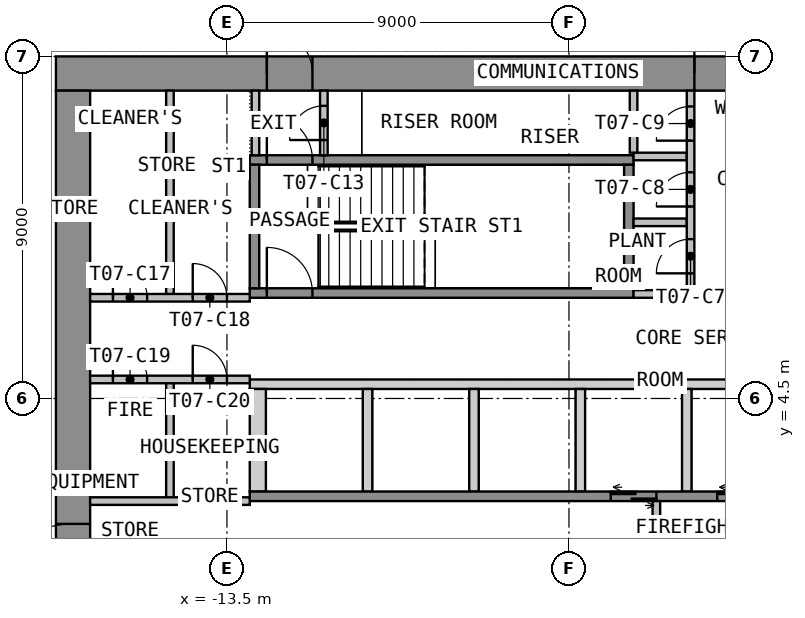
"""IFC4 building model, lengths in metres.
Left out: names, types, materials, properties, quantities, classifications, styles, units other than length and angle.
Written with IfcOpenShell. Run it as: python <this file> out.ifc"""

import sys

from ifc_helpers import new_model, si_unit, direction, frame, frame_2d, origin, place, context, subcontext, project, spatial, polyline, rectangle, outline, extrude, element, fill, save


model = new_model("IFC4")
c1 = context("Model", 3, precision=1e-05, world=origin(), true_north=direction((0.0, 1.0)))
c2 = subcontext(c1, "Body", "Model", "MODEL_VIEW")
j1 = project(units=[si_unit("LENGTHUNIT", "METRE"), si_unit("PLANEANGLEUNIT", "RADIAN")], contexts=[c1])
p1 = place(None, origin())
s1 = spatial("IfcSite", under=j1, at=p1, CompositionType="ELEMENT")
p2 = place(p1, origin())
s2 = spatial("IfcBuilding", under=s1, at=p2, CompositionType="ELEMENT")
p3 = place(p2, frame((0.0, 0.0, 104.7)))
s3 = spatial("IfcBuildingStorey", under=s2, at=p3, CompositionType="ELEMENT", Elevation=104.7)
p4 = place(p3, frame((-18.0, 13.05, 0.0), z_axis=(0.0, 0.0, 1.0), x_axis=(1.0, 0.0, 0.0)))
e1 = element("IfcWall", 1, at=p4, inside=s3, PredefinedType="SHEAR", context=c2, shape_type="SweptSolid", body=[
    extrude(rectangle(XDim=36.0, YDim=0.9, at=frame_2d((18.0, 0.0))), origin(), (0.0, 0.0, 1.0), 3.525),
])
p5 = place(p4, frame((16.8, 0.0, 0.0)))
e2 = element("IfcOpeningElement", 2, at=p5, cuts=e1, PredefinedType="OPENING", context=c2, shape_type="SweptSolid", body=[
    extrude(rectangle(XDim=2.4, YDim=2.1, at=frame_2d((1.2, 1.05))), frame((0.0, 0.46, 0.0), z_axis=(0.0, -1.0, 0.0), x_axis=(1.0, 0.0, 0.0)), (0.0, 0.0, 1.0), 0.92),
])
p6 = place(p4, frame((5.55, 0.0, 0.0)))
e3 = element("IfcOpeningElement", 3, at=p6, cuts=e1, PredefinedType="OPENING", context=c2, shape_type="SweptSolid", body=[
    extrude(rectangle(XDim=1.2, YDim=2.1, at=frame_2d((0.6, 1.05))), frame((0.0, 0.46, 0.0), z_axis=(0.0, -1.0, 0.0), x_axis=(1.0, 0.0, 0.0)), (0.0, 0.0, 1.0), 0.92),
])
p7 = place(p4, frame((29.25, 0.0, 0.0)))
e4 = element("IfcOpeningElement", 4, at=p7, cuts=e1, PredefinedType="OPENING", context=c2, shape_type="SweptSolid", body=[
    extrude(rectangle(XDim=1.2, YDim=2.1, at=frame_2d((0.6, 1.05))), frame((0.0, 0.46, 0.0), z_axis=(0.0, -1.0, 0.0), x_axis=(1.0, 0.0, 0.0)), (0.0, 0.0, 1.0), 0.92),
])
p8 = place(p3, frame((-17.55, -12.6, 0.0), z_axis=(0.0, 0.0, 1.0), x_axis=(0.0, 1.0, 0.0)))
e5 = element("IfcWall", 5, at=p8, inside=s3, PredefinedType="SHEAR", context=c2, shape_type="SweptSolid", body=[
    extrude(rectangle(XDim=25.2, YDim=0.9, at=frame_2d((12.6, 0.0))), origin(), (0.0, 0.0, 1.0), 3.525),
])
p9 = place(p8, frame((11.4, 0.0, 0.0)))
e6 = element("IfcOpeningElement", 6, at=p9, cuts=e5, PredefinedType="OPENING", context=c2, shape_type="SweptSolid", body=[
    extrude(rectangle(XDim=2.4, YDim=2.1, at=frame_2d((1.2, 1.05))), frame((0.0, 0.46, 0.0), z_axis=(0.0, -1.0, 0.0), x_axis=(1.0, 0.0, 0.0)), (0.0, 0.0, 1.0), 0.92),
])
p10 = place(p3, origin())
e7 = element("IfcWall", 7, at=p10, inside=s3, PredefinedType="SHEAR", context=c2, shape_type="SweptSolid", body=[
    extrude(outline(polyline([(-12.9, 4.75), (12.9, 4.75), (12.9, 5.0), (-12.9, 5.0), (-12.9, 4.75)])), origin(), (0.0, 0.0, 1.0), 3.525),
])
p11 = place(p3, origin())
e8 = element("IfcWall", 8, at=p11, inside=s3, PredefinedType="SHEAR", context=c2, shape_type="SweptSolid", body=[
    extrude(outline(polyline([(-12.9, 2.05), (-12.475, 2.05), (-12.475, 4.75), (-12.9, 4.75), (-12.9, 2.05)])), origin(), (0.0, 0.0, 1.0), 3.525),
])
p12 = place(p3, origin())
e9 = element("IfcWall", 9, at=p12, inside=s3, PredefinedType="SHEAR", context=c2, shape_type="SweptSolid", body=[
    extrude(outline(polyline([(-9.925, 2.05), (-9.675, 2.05), (-9.675, 4.75), (-9.925, 4.75), (-9.925, 2.05)])), origin(), (0.0, 0.0, 1.0), 3.525),
])
p13 = place(p3, origin())
e10 = element("IfcWall", 10, at=p13, inside=s3, PredefinedType="SHEAR", context=c2, shape_type="SweptSolid", body=[
    extrude(outline(polyline([(-7.125, 2.05), (-6.875, 2.05), (-6.875, 4.75), (-7.125, 4.75), (-7.125, 2.05)])), origin(), (0.0, 0.0, 1.0), 3.525),
])
p14 = place(p3, origin())
e11 = element("IfcWall", 11, at=p14, inside=s3, PredefinedType="SHEAR", context=c2, shape_type="SweptSolid", body=[
    extrude(outline(polyline([(-4.325, 2.05), (-4.075, 2.05), (-4.075, 4.75), (-4.325, 4.75), (-4.325, 2.05)])), origin(), (0.0, 0.0, 1.0), 3.525),
])
p15 = place(p3, origin())
e12 = element("IfcWall", 12, at=p15, inside=s3, PredefinedType="SHEAR", context=c2, shape_type="SweptSolid", body=[
    extrude(outline(polyline([(-1.525, 2.05), (-1.275, 2.05), (-1.275, 4.75), (-1.525, 4.75), (-1.525, 2.05)])), origin(), (0.0, 0.0, 1.0), 3.525),
])
p16 = place(p3, frame((-12.9, 1.925, 0.0), z_axis=(0.0, 0.0, 1.0), x_axis=(1.0, 0.0, 0.0)))
e13 = element("IfcWall", 13, at=p16, inside=s3, PredefinedType="SHEAR", context=c2, shape_type="SweptSolid", body=[
    extrude(rectangle(XDim=25.8, YDim=0.25, at=frame_2d((12.9, 0.0))), origin(), (0.0, 0.0, 1.0), 3.525),
])
p17 = place(p16, frame((9.5, 0.0, 0.0)))
e14 = element("IfcOpeningElement", 14, at=p17, cuts=e13, PredefinedType="OPENING", context=c2, shape_type="SweptSolid", body=[
    extrude(rectangle(XDim=1.2, YDim=2.1, at=frame_2d((0.6, 1.05))), frame((0.0, 0.135, 0.0), z_axis=(0.0, -1.0, 0.0), x_axis=(1.0, 0.0, 0.0)), (0.0, 0.0, 1.0), 0.27),
])
p18 = place(p16, frame((12.3, 0.0, 0.0)))
e15 = element("IfcOpeningElement", 15, at=p18, cuts=e13, PredefinedType="OPENING", context=c2, shape_type="SweptSolid", body=[
    extrude(rectangle(XDim=1.2, YDim=2.1, at=frame_2d((0.6, 1.05))), frame((0.0, 0.135, 0.0), z_axis=(0.0, -1.0, 0.0), x_axis=(1.0, 0.0, 0.0)), (0.0, 0.0, 1.0), 0.27),
])
p19 = place(p16, frame((15.1, 0.0, 0.0)))
e16 = element("IfcOpeningElement", 16, at=p19, cuts=e13, PredefinedType="OPENING", context=c2, shape_type="SweptSolid", body=[
    extrude(rectangle(XDim=1.2, YDim=2.1, at=frame_2d((0.6, 1.05))), frame((0.0, 0.135, 0.0), z_axis=(0.0, -1.0, 0.0), x_axis=(1.0, 0.0, 0.0)), (0.0, 0.0, 1.0), 0.27),
])
p20 = place(p16, frame((17.9, 0.0, 0.0)))
e17 = element("IfcOpeningElement", 17, at=p20, cuts=e13, PredefinedType="OPENING", context=c2, shape_type="SweptSolid", body=[
    extrude(rectangle(XDim=1.2, YDim=2.1, at=frame_2d((0.6, 1.05))), frame((0.0, 0.135, 0.0), z_axis=(0.0, -1.0, 0.0), x_axis=(1.0, 0.0, 0.0)), (0.0, 0.0, 1.0), 0.27),
])
p21 = place(p16, frame((20.7, 0.0, 0.0)))
e18 = element("IfcOpeningElement", 18, at=p21, cuts=e13, PredefinedType="OPENING", context=c2, shape_type="SweptSolid", body=[
    extrude(rectangle(XDim=1.2, YDim=2.1, at=frame_2d((0.6, 1.05))), frame((0.0, 0.135, 0.0), z_axis=(0.0, -1.0, 0.0), x_axis=(1.0, 0.0, 0.0)), (0.0, 0.0, 1.0), 0.27),
])
p22 = place(p16, frame((23.5, 0.0, 0.0)))
e19 = element("IfcOpeningElement", 19, at=p22, cuts=e13, PredefinedType="OPENING", context=c2, shape_type="SweptSolid", body=[
    extrude(rectangle(XDim=1.2, YDim=2.1, at=frame_2d((0.6, 1.05))), frame((0.0, 0.135, 0.0), z_axis=(0.0, -1.0, 0.0), x_axis=(1.0, 0.0, 0.0)), (0.0, 0.0, 1.0), 0.27),
])
p23 = place(p3, frame((-2.2, -1.8, 0.0), z_axis=(0.0, 0.0, 1.0), x_axis=(0.0, 1.0, 0.0)))
e20 = element("IfcWall", 20, at=p23, inside=s3, PredefinedType="PARTITIONING", context=c2, shape_type="SweptSolid", body=[
    extrude(rectangle(XDim=3.6, YDim=0.2, at=frame_2d((1.8, 0.0))), origin(), (0.0, 0.0, 1.0), 3.525),
])
p24 = place(p23, frame((1.2, 0.0, 0.0)))
e21 = element("IfcOpeningElement", 21, at=p24, cuts=e20, PredefinedType="OPENING", context=c2, shape_type="SweptSolid", body=[
    extrude(rectangle(XDim=1.2, YDim=2.1, at=frame_2d((0.6, 1.05))), frame((0.0, 0.11, 0.0), z_axis=(0.0, -1.0, 0.0), x_axis=(1.0, 0.0, 0.0)), (0.0, 0.0, 1.0), 0.22),
])
p25 = place(p3, frame((-12.9, 7.275, 0.0), z_axis=(0.0, 0.0, 1.0), x_axis=(1.0, 0.0, 0.0)))
e22 = element("IfcWall", 22, at=p25, inside=s3, PredefinedType="SHEAR", context=c2, shape_type="SweptSolid", body=[
    extrude(rectangle(XDim=10.1, YDim=0.25, at=frame_2d((5.05, 0.0))), origin(), (0.0, 0.0, 1.0), 3.525),
])
p26 = place(p25, frame((0.45, 0.0, 0.0)))
e23 = element("IfcOpeningElement", 23, at=p26, cuts=e22, PredefinedType="OPENING", context=c2, shape_type="SweptSolid", body=[
    extrude(rectangle(XDim=1.2, YDim=2.1, at=frame_2d((0.6, 1.05))), frame((0.0, 0.135, 0.0), z_axis=(0.0, -1.0, 0.0), x_axis=(1.0, 0.0, 0.0)), (0.0, 0.0, 1.0), 0.27),
])
p27 = place(p3, frame((-12.9, 10.775, 0.0), z_axis=(0.0, 0.0, 1.0), x_axis=(1.0, 0.0, 0.0)))
e24 = element("IfcWall", 24, at=p27, inside=s3, PredefinedType="SHEAR", context=c2, shape_type="SweptSolid", body=[
    extrude(rectangle(XDim=10.1, YDim=0.25, at=frame_2d((5.05, 0.0))), origin(), (0.0, 0.0, 1.0), 3.525),
])
p28 = place(p27, frame((0.45, 0.0, 0.0)))
e25 = element("IfcOpeningElement", 25, at=p28, cuts=e24, PredefinedType="OPENING", context=c2, shape_type="SweptSolid", body=[
    extrude(rectangle(XDim=1.2, YDim=2.1, at=frame_2d((0.6, 1.05))), frame((0.0, 0.135, 0.0), z_axis=(0.0, -1.0, 0.0), x_axis=(1.0, 0.0, 0.0)), (0.0, 0.0, 1.0), 0.27),
])
for number, where, z_axis, x_axis in (
    (26, (-12.775, 7.4, 0.0), (0.0, 0.0, 1.0), (0.0, 1.0, 0.0)),
    (27, (-2.925, 7.4, 0.0), (0.0, 0.0, 1.0), (0.0, 1.0, 0.0)),
):
    element("IfcWall", number, at=place(p3, frame(where, z_axis=z_axis, x_axis=x_axis)), inside=s3, PredefinedType="SHEAR", context=c2, shape_type="SweptSolid", body=[
        extrude(rectangle(XDim=3.25, YDim=0.25, at=frame_2d((1.625, 0.0))), origin(), (0.0, 0.0, 1.0), 3.525),
    ])
for number, where, z_axis, x_axis in (
    (28, (-2.8, 7.25, 0.0), (0.0, 0.0, 1.0), (1.0, 0.0, 0.0)),
    (29, (-2.8, 9.135, 0.0), (0.0, 0.0, 1.0), (1.0, 0.0, 0.0)),
    (30, (-2.8, 10.867, 0.0), (0.0, 0.0, 1.0), (1.0, 0.0, 0.0)),
):
    element("IfcWall", number, at=place(p3, frame(where, z_axis=z_axis, x_axis=x_axis)), inside=s3, PredefinedType="PARTITIONING", context=c2, shape_type="SweptSolid", body=[
        extrude(rectangle(XDim=1.4, YDim=0.2, at=frame_2d((0.7, 0.0))), origin(), (0.0, 0.0, 1.0), 3.525),
    ])
p29 = place(p3, frame((-1.3, 7.15, 0.0), z_axis=(0.0, 0.0, 1.0), x_axis=(0.0, 1.0, 0.0)))
e31 = element("IfcWall", 31, at=p29, inside=s3, PredefinedType="PARTITIONING", context=c2, shape_type="SweptSolid", body=[
    extrude(rectangle(XDim=5.45, YDim=0.2, at=frame_2d((2.725, 0.0))), origin(), (0.0, 0.0, 1.0), 3.525),
])
p30 = place(p29, frame((0.643, 0.0, 0.0)))
e32 = element("IfcOpeningElement", 32, at=p30, cuts=e31, PredefinedType="OPENING", context=c2, shape_type="SweptSolid", body=[
    extrude(rectangle(XDim=0.9, YDim=2.1, at=frame_2d((0.45, 1.05))), frame((0.0, 0.11, 0.0), z_axis=(0.0, -1.0, 0.0), x_axis=(1.0, 0.0, 0.0)), (0.0, 0.0, 1.0), 0.22),
])
p31 = place(p29, frame((2.401, 0.0, 0.0)))
e33 = element("IfcOpeningElement", 33, at=p31, cuts=e31, PredefinedType="OPENING", context=c2, shape_type="SweptSolid", body=[
    extrude(rectangle(XDim=0.9, YDim=2.1, at=frame_2d((0.45, 1.05))), frame((0.0, 0.11, 0.0), z_axis=(0.0, -1.0, 0.0), x_axis=(1.0, 0.0, 0.0)), (0.0, 0.0, 1.0), 0.22),
])
p32 = place(p29, frame((4.134, 0.0, 0.0)))
e34 = element("IfcOpeningElement", 34, at=p32, cuts=e31, PredefinedType="OPENING", context=c2, shape_type="SweptSolid", body=[
    extrude(rectangle(XDim=0.9, YDim=2.1, at=frame_2d((0.45, 1.05))), frame((0.0, 0.11, 0.0), z_axis=(0.0, -1.0, 0.0), x_axis=(1.0, 0.0, 0.0)), (0.0, 0.0, 1.0), 0.22),
])
p33 = place(p3, frame((-12.75, 10.9, 0.0), z_axis=(0.0, 0.0, 1.0), x_axis=(0.0, 1.0, 0.0)))
e35 = element("IfcWall", 35, at=p33, inside=s3, PredefinedType="PARTITIONING", context=c2, shape_type="SweptSolid", body=[
    extrude(rectangle(XDim=1.7, YDim=0.2, at=frame_2d((0.85, 0.0))), origin(), (0.0, 0.0, 1.0), 3.525),
])
p34 = place(p3, frame((-10.95, 10.9, 0.0), z_axis=(0.0, 0.0, 1.0), x_axis=(0.0, 1.0, 0.0)))
e36 = element("IfcWall", 36, at=p34, inside=s3, PredefinedType="PARTITIONING", context=c2, shape_type="SweptSolid", body=[
    extrude(rectangle(XDim=1.7, YDim=0.2, at=frame_2d((0.85, 0.0))), origin(), (0.0, 0.0, 1.0), 3.525),
])
p35 = place(p34, frame((0.4, 0.0, 0.0)))
e37 = element("IfcOpeningElement", 37, at=p35, cuts=e36, PredefinedType="OPENING", context=c2, shape_type="SweptSolid", body=[
    extrude(rectangle(XDim=0.9, YDim=2.1, at=frame_2d((0.45, 1.05))), frame((0.0, 0.11, 0.0), z_axis=(0.0, -1.0, 0.0), x_axis=(1.0, 0.0, 0.0)), (0.0, 0.0, 1.0), 0.22),
])
p36 = place(p3, frame((-15.0, 7.15, 0.0), z_axis=(0.0, 0.0, 1.0), x_axis=(0.0, 1.0, 0.0)))
e38 = element("IfcWall", 38, at=p36, inside=s3, PredefinedType="PARTITIONING", context=c2, shape_type="SweptSolid", body=[
    extrude(rectangle(XDim=5.45, YDim=0.2, at=frame_2d((2.725, 0.0))), origin(), (0.0, 0.0, 1.0), 3.525),
])
p37 = place(p3, frame((-17.1, 7.15, 0.0), z_axis=(0.0, 0.0, 1.0), x_axis=(1.0, 0.0, 0.0)))
e39 = element("IfcWall", 39, at=p37, inside=s3, PredefinedType="PARTITIONING", context=c2, shape_type="SweptSolid", body=[
    extrude(rectangle(XDim=4.2, YDim=0.2, at=frame_2d((2.1, 0.0))), origin(), (0.0, 0.0, 1.0), 3.525),
])
p38 = place(p37, frame((0.6, 0.0, 0.0)))
e40 = element("IfcOpeningElement", 40, at=p38, cuts=e39, PredefinedType="OPENING", context=c2, shape_type="SweptSolid", body=[
    extrude(rectangle(XDim=0.9, YDim=2.1, at=frame_2d((0.45, 1.05))), frame((0.0, 0.11, 0.0), z_axis=(0.0, -1.0, 0.0), x_axis=(1.0, 0.0, 0.0)), (0.0, 0.0, 1.0), 0.22),
])
p39 = place(p37, frame((2.7, 0.0, 0.0)))
e41 = element("IfcOpeningElement", 41, at=p39, cuts=e39, PredefinedType="OPENING", context=c2, shape_type="SweptSolid", body=[
    extrude(rectangle(XDim=0.9, YDim=2.1, at=frame_2d((0.45, 1.05))), frame((0.0, 0.11, 0.0), z_axis=(0.0, -1.0, 0.0), x_axis=(1.0, 0.0, 0.0)), (0.0, 0.0, 1.0), 0.22),
])
p40 = place(p3, frame((-15.0, 1.8, 0.0), z_axis=(0.0, 0.0, 1.0), x_axis=(0.0, 1.0, 0.0)))
e42 = element("IfcWall", 42, at=p40, inside=s3, PredefinedType="PARTITIONING", context=c2, shape_type="SweptSolid", body=[
    extrude(rectangle(XDim=3.2, YDim=0.2, at=frame_2d((1.6, 0.0))), origin(), (0.0, 0.0, 1.0), 3.525),
])
p41 = place(p3, frame((-17.1, 5.0, 0.0), z_axis=(0.0, 0.0, 1.0), x_axis=(1.0, 0.0, 0.0)))
e43 = element("IfcWall", 43, at=p41, inside=s3, PredefinedType="PARTITIONING", context=c2, shape_type="SweptSolid", body=[
    extrude(rectangle(XDim=4.2, YDim=0.2, at=frame_2d((2.1, 0.0))), origin(), (0.0, 0.0, 1.0), 3.525),
])
p42 = place(p41, frame((0.6, 0.0, 0.0)))
e44 = element("IfcOpeningElement", 44, at=p42, cuts=e43, PredefinedType="OPENING", context=c2, shape_type="SweptSolid", body=[
    extrude(rectangle(XDim=0.9, YDim=2.1, at=frame_2d((0.45, 1.05))), frame((0.0, 0.11, 0.0), z_axis=(0.0, -1.0, 0.0), x_axis=(1.0, 0.0, 0.0)), (0.0, 0.0, 1.0), 0.22),
])
p43 = place(p41, frame((2.7, 0.0, 0.0)))
e45 = element("IfcOpeningElement", 45, at=p43, cuts=e43, PredefinedType="OPENING", context=c2, shape_type="SweptSolid", body=[
    extrude(rectangle(XDim=0.9, YDim=2.1, at=frame_2d((0.45, 1.05))), frame((0.0, 0.11, 0.0), z_axis=(0.0, -1.0, 0.0), x_axis=(1.0, 0.0, 0.0)), (0.0, 0.0, 1.0), 0.22),
])
p44 = place(p3, frame((-17.1, 1.8, 0.0), z_axis=(0.0, 0.0, 1.0), x_axis=(1.0, 0.0, 0.0)))
e46 = element("IfcWall", 46, at=p44, inside=s3, PredefinedType="PARTITIONING", context=c2, shape_type="SweptSolid", body=[
    extrude(rectangle(XDim=4.2, YDim=0.2, at=frame_2d((2.1, 0.0))), origin(), (0.0, 0.0, 1.0), 3.525),
])
p45 = place(p3, frame((-2.8, 10.969, 0.0), z_axis=(0.0, 0.0, 1.0), x_axis=(0.0, 1.0, 0.0)))
e47 = element("IfcWall", 47, at=p45, inside=s3, PredefinedType="PARTITIONING", context=c2, shape_type="SweptSolid", body=[
    extrude(rectangle(XDim=1.631, YDim=0.2, at=frame_2d((0.815, 0.0))), origin(), (0.0, 0.0, 1.0), 3.525),
])
p46 = place(p9, origin())
e48 = element("IfcDoor", 48, at=p46, inside=s3, OperationType="DOUBLE_DOOR_DOUBLE_SWING", PredefinedType="DOOR", context=c2, shape_type="SweptSolid", body=[
    extrude(rectangle(XDim=2.4, YDim=2.1, at=frame_2d((1.2, 1.05))), frame((0.0, 0.025, 0.0), z_axis=(0.0, -1.0, 0.0), x_axis=(1.0, 0.0, 0.0)), (0.0, 0.0, 1.0), 0.05),
])
fill(e6, e48)
p47 = place(p5, origin())
e49 = element("IfcDoor", 49, at=p47, inside=s3, OperationType="DOUBLE_DOOR_DOUBLE_SWING", PredefinedType="DOOR", context=c2, shape_type="SweptSolid", body=[
    extrude(rectangle(XDim=2.4, YDim=2.1, at=frame_2d((1.2, 1.05))), frame((0.0, 0.025, 0.0), z_axis=(0.0, -1.0, 0.0), x_axis=(1.0, 0.0, 0.0)), (0.0, 0.0, 1.0), 0.05),
])
fill(e2, e49)
p48 = place(p6, origin())
e50 = element("IfcDoor", 50, at=p48, inside=s3, OperationType="SINGLE_SWING_RIGHT", PredefinedType="DOOR", context=c2, shape_type="SweptSolid", body=[
    extrude(rectangle(XDim=1.2, YDim=2.1, at=frame_2d((0.6, 1.05))), frame((0.0, 0.025, 0.0), z_axis=(0.0, -1.0, 0.0), x_axis=(1.0, 0.0, 0.0)), (0.0, 0.0, 1.0), 0.05),
])
fill(e3, e50)
p49 = place(p17, origin())
e51 = element("IfcDoor", 51, at=p49, inside=s3, OperationType="DOUBLE_DOOR_SLIDING", PredefinedType="DOOR", context=c2, shape_type="SweptSolid", body=[
    extrude(rectangle(XDim=1.2, YDim=2.1, at=frame_2d((0.6, 1.05))), frame((0.0, 0.025, 0.0), z_axis=(0.0, -1.0, 0.0), x_axis=(1.0, 0.0, 0.0)), (0.0, 0.0, 1.0), 0.05),
])
fill(e14, e51)
p50 = place(p18, origin())
e52 = element("IfcDoor", 52, at=p50, inside=s3, OperationType="DOUBLE_DOOR_SLIDING", PredefinedType="DOOR", context=c2, shape_type="SweptSolid", body=[
    extrude(rectangle(XDim=1.2, YDim=2.1, at=frame_2d((0.6, 1.05))), frame((0.0, 0.025, 0.0), z_axis=(0.0, -1.0, 0.0), x_axis=(1.0, 0.0, 0.0)), (0.0, 0.0, 1.0), 0.05),
])
fill(e15, e52)
p51 = place(p26, origin())
e53 = element("IfcDoor", 53, at=p51, inside=s3, OperationType="SINGLE_SWING_LEFT", PredefinedType="DOOR", context=c2, shape_type="SweptSolid", body=[
    extrude(rectangle(XDim=1.2, YDim=2.1, at=frame_2d((0.6, 1.05))), frame((0.0, 0.025, 0.0), z_axis=(0.0, -1.0, 0.0), x_axis=(1.0, 0.0, 0.0)), (0.0, 0.0, 1.0), 0.05),
])
fill(e23, e53)
p52 = place(p30, origin())
e54 = element("IfcDoor", 54, at=p52, inside=s3, OperationType="SINGLE_SWING_LEFT", PredefinedType="DOOR", context=c2, shape_type="SweptSolid", body=[
    extrude(rectangle(XDim=0.9, YDim=2.1, at=frame_2d((0.45, 1.05))), frame((0.0, 0.025, 0.0), z_axis=(0.0, -1.0, 0.0), x_axis=(1.0, 0.0, 0.0)), (0.0, 0.0, 1.0), 0.05),
])
fill(e32, e54)
p53 = place(p31, origin())
e55 = element("IfcDoor", 55, at=p53, inside=s3, OperationType="SINGLE_SWING_LEFT", PredefinedType="DOOR", context=c2, shape_type="SweptSolid", body=[
    extrude(rectangle(XDim=0.9, YDim=2.1, at=frame_2d((0.45, 1.05))), frame((0.0, 0.025, 0.0), z_axis=(0.0, -1.0, 0.0), x_axis=(1.0, 0.0, 0.0)), (0.0, 0.0, 1.0), 0.05),
])
fill(e33, e55)
p54 = place(p32, origin())
e56 = element("IfcDoor", 56, at=p54, inside=s3, OperationType="SINGLE_SWING_LEFT", PredefinedType="DOOR", context=c2, shape_type="SweptSolid", body=[
    extrude(rectangle(XDim=0.9, YDim=2.1, at=frame_2d((0.45, 1.05))), frame((0.0, 0.025, 0.0), z_axis=(0.0, -1.0, 0.0), x_axis=(1.0, 0.0, 0.0)), (0.0, 0.0, 1.0), 0.05),
])
fill(e34, e56)
p55 = place(p28, origin())
e57 = element("IfcDoor", 57, at=p55, inside=s3, OperationType="SINGLE_SWING_RIGHT", PredefinedType="DOOR", context=c2, shape_type="SweptSolid", body=[
    extrude(rectangle(XDim=1.2, YDim=2.1, at=frame_2d((0.6, 1.05))), frame((0.0, 0.025, 0.0), z_axis=(0.0, -1.0, 0.0), x_axis=(1.0, 0.0, 0.0)), (0.0, 0.0, 1.0), 0.05),
])
fill(e25, e57)
p56 = place(p35, origin())
e58 = element("IfcDoor", 58, at=p56, inside=s3, OperationType="SINGLE_SWING_LEFT", PredefinedType="DOOR", context=c2, shape_type="SweptSolid", body=[
    extrude(rectangle(XDim=0.9, YDim=2.1, at=frame_2d((0.45, 1.05))), frame((0.0, 0.025, 0.0), z_axis=(0.0, -1.0, 0.0), x_axis=(1.0, 0.0, 0.0)), (0.0, 0.0, 1.0), 0.05),
])
fill(e37, e58)
p57 = place(p38, origin())
e59 = element("IfcDoor", 59, at=p57, inside=s3, OperationType="SINGLE_SWING_LEFT", PredefinedType="DOOR", context=c2, shape_type="SweptSolid", body=[
    extrude(rectangle(XDim=0.9, YDim=2.1, at=frame_2d((0.45, 1.05))), frame((0.0, 0.025, 0.0), z_axis=(0.0, -1.0, 0.0), x_axis=(1.0, 0.0, 0.0)), (0.0, 0.0, 1.0), 0.05),
])
fill(e40, e59)
p58 = place(p39, origin())
e60 = element("IfcDoor", 60, at=p58, inside=s3, OperationType="SINGLE_SWING_LEFT", PredefinedType="DOOR", context=c2, shape_type="SweptSolid", body=[
    extrude(rectangle(XDim=0.9, YDim=2.1, at=frame_2d((0.45, 1.05))), frame((0.0, 0.025, 0.0), z_axis=(0.0, -1.0, 0.0), x_axis=(1.0, 0.0, 0.0)), (0.0, 0.0, 1.0), 0.05),
])
fill(e41, e60)
p59 = place(p42, origin())
e61 = element("IfcDoor", 61, at=p59, inside=s3, OperationType="SINGLE_SWING_LEFT", PredefinedType="DOOR", context=c2, shape_type="SweptSolid", body=[
    extrude(rectangle(XDim=0.9, YDim=2.1, at=frame_2d((0.45, 1.05))), frame((0.0, 0.025, 0.0), z_axis=(0.0, -1.0, 0.0), x_axis=(1.0, 0.0, 0.0)), (0.0, 0.0, 1.0), 0.05),
])
fill(e44, e61)
p60 = place(p43, origin())
e62 = element("IfcDoor", 62, at=p60, inside=s3, OperationType="SINGLE_SWING_LEFT", PredefinedType="DOOR", context=c2, shape_type="SweptSolid", body=[
    extrude(rectangle(XDim=0.9, YDim=2.1, at=frame_2d((0.45, 1.05))), frame((0.0, 0.025, 0.0), z_axis=(0.0, -1.0, 0.0), x_axis=(1.0, 0.0, 0.0)), (0.0, 0.0, 1.0), 0.05),
])
fill(e45, e62)
save(model, sys.argv[1])
